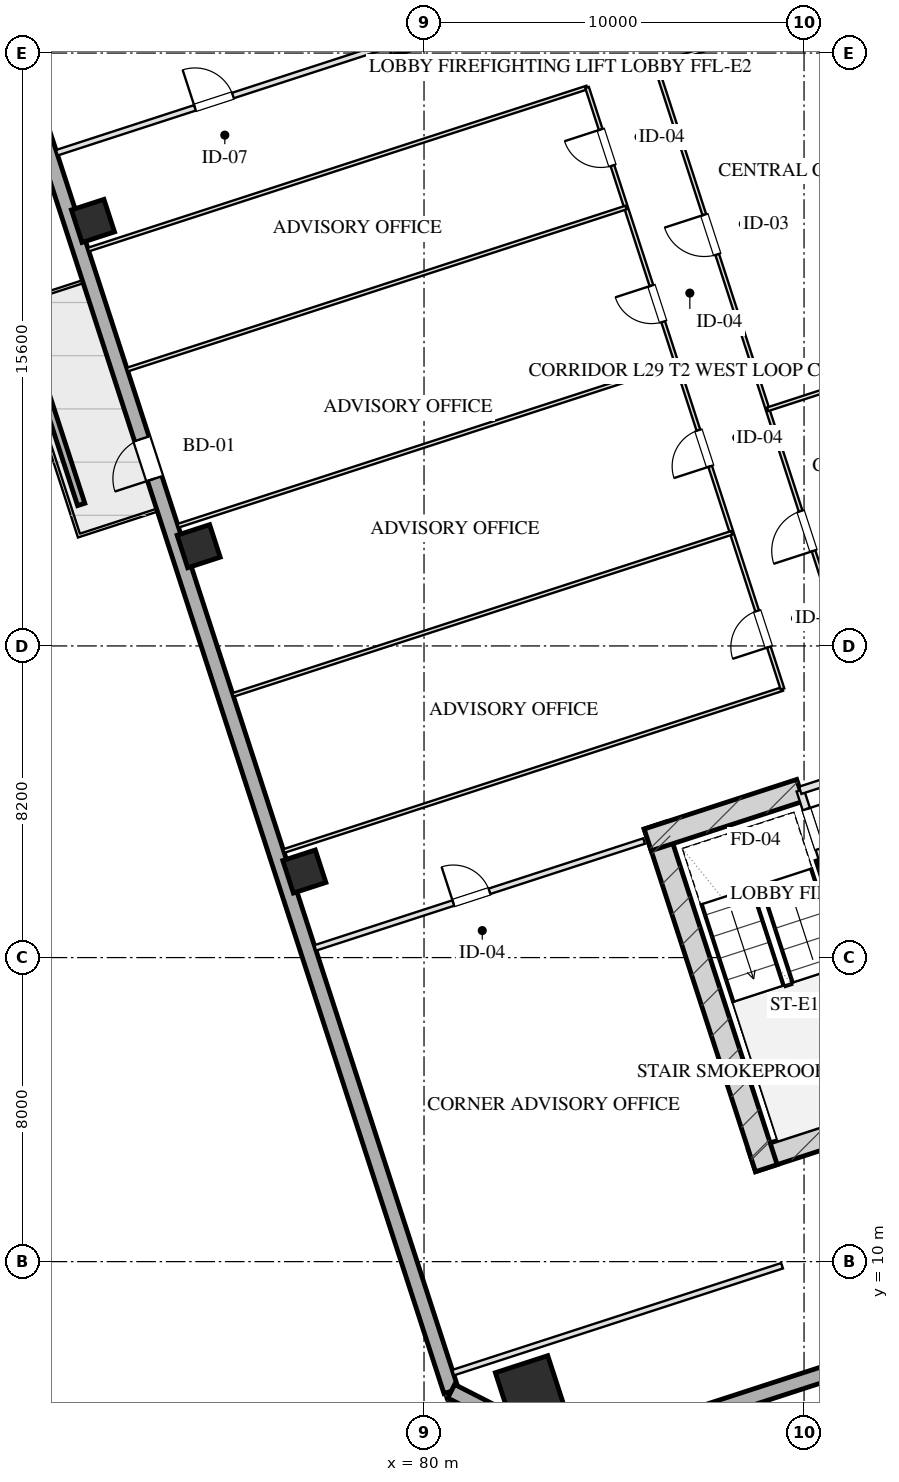
"""IFC4 building model, lengths in metres.
Left out: names, types, materials, properties, quantities, classifications, styles, units other than length and angle.
Written with IfcOpenShell. Run it as: python <this file> out.ifc"""

import sys

from ifc_helpers import new_model, si_unit, direction, frame, frame_2d, origin, origin_2d, place, context, subcontext, project, spatial, rectangle, hollow_rectangle, extrude, element, fill, save


model = new_model("IFC4")
c1 = context("Model", 3, precision=1e-05, world=origin(), true_north=direction((0.0, 1.0)))
c2 = subcontext(c1, "Body", "Model", "MODEL_VIEW")
j1 = project(units=[si_unit("LENGTHUNIT", "METRE"), si_unit("PLANEANGLEUNIT", "RADIAN")], contexts=[c1])
p1 = place(None, origin())
s1 = spatial("IfcSite", under=j1, at=p1, CompositionType="ELEMENT")
p2 = place(p1, origin())
s2 = spatial("IfcBuilding", under=s1, at=p2, CompositionType="ELEMENT")
p3 = place(p2, frame((0.0, 0.0, 113.85)))
s3 = spatial("IfcBuildingStorey", under=s2, at=p3, CompositionType="ELEMENT", Elevation=113.85)
p4 = place(p3, frame((88.63, 12.652, 0.0), z_axis=(0.0, 0.0, 1.0), x_axis=(0.95105714907, 0.309015046886, 0.0)))
e1 = element("IfcWall", 1, at=p4, inside=s3, PredefinedType="SHEAR", context=c2, shape_type="SweptSolid", body=[
    extrude(rectangle(XDim=16.4, YDim=0.6, at=frame_2d((8.2, 0.0))), origin(), (0.0, 0.0, 1.0), 3.45),
])
p5 = place(p3, frame((86.078, 21.475, 0.0), z_axis=(0.0, 0.0, 1.0), x_axis=(0.309017938678, -0.951056209472, 0.0)))
e2 = element("IfcWall", 2, at=p5, inside=s3, PredefinedType="SHEAR", context=c2, shape_type="SweptSolid", body=[
    extrude(rectangle(XDim=9.48, YDim=0.6, at=frame_2d((4.74, 0.0))), origin(), (0.0, 0.0, 1.0), 3.45),
])
p6 = place(p3, frame((90.486, 20.594, 0.0), z_axis=(0.0, 0.0, 1.0), x_axis=(0.309020428229, -0.951055400562, 0.0)))
e3 = element("IfcWall", 3, at=p6, inside=s3, PredefinedType="SHEAR", context=c2, shape_type="SweptSolid", body=[
    extrude(rectangle(XDim=6.98, YDim=0.35, at=frame_2d((3.49, 0.0))), origin(), (0.0, 0.0, 1.0), 3.45),
])
p7 = place(p3, frame((85.886, 21.097, 0.0), z_axis=(0.0, 0.0, 1.0), x_axis=(0.951068073652, 0.308981422225, 0.0)))
e4 = element("IfcWall", 4, at=p7, inside=s3, PredefinedType="SHEAR", context=c2, shape_type="SweptSolid", body=[
    extrude(rectangle(XDim=4.22, YDim=0.6, at=frame_2d((2.11, 0.0))), origin(), (0.0, 0.0, 1.0), 3.45),
])
p8 = place(p3, frame((79.466, 41.828, 0.0), z_axis=(0.0, 0.0, 1.0), x_axis=(-0.309041232772, 0.951048640421, 0.0)))
e5 = element("IfcWall", 5, at=p8, inside=s3, PredefinedType="SHEAR", context=c2, shape_type="SweptSolid", body=[
    extrude(rectangle(XDim=9.48, YDim=0.6, at=frame_2d((4.74, 0.0))), origin(), (0.0, 0.0, 1.0), 3.45),
])
p9 = place(p3, frame((79.087, 42.021, 0.0), z_axis=(0.0, 0.0, 1.0), x_axis=(0.951062550203, 0.3089984233, 0.0)))
e6 = element("IfcWall", 6, at=p9, inside=s3, PredefinedType="SHEAR", context=c2, shape_type="SweptSolid", body=[
    extrude(rectangle(XDim=4.22, YDim=0.6, at=frame_2d((2.11, 0.0))), origin(), (0.0, 0.0, 1.0), 3.45),
])
p10 = place(p3, frame((82.791, 6.612, 0.0), z_axis=(0.0, 0.0, 1.0), x_axis=(0.951056516295, 0.309016994375, 0.0)))
e7 = element("IfcColumn", 7, at=p10, inside=s3, PredefinedType="COLUMN", context=c2, shape_type="SweptSolid", body=[
    extrude(hollow_rectangle(XDim=1.45, YDim=1.45, WallThickness=0.05, at=origin_2d()), origin(), (0.0, 0.0, 1.0), 3.451),
])
for number, where, z_axis, x_axis in (
    (8, (76.851, 20.264, 0.0), (0.0, 0.0, 1.0), (0.951, 0.309, 0.0)),
    (9, (74.07, 28.824, 0.0), (0.0, 0.0, 1.0), (0.951, 0.309, 0.0)),
    (10, (71.289, 37.384, 0.0), (0.0, 0.0, 1.0), (0.951, 0.309, 0.0)),
):
    element("IfcColumn", number, at=place(p3, frame(where, z_axis=z_axis, x_axis=x_axis)), inside=s3, PredefinedType="COLUMN", context=c2, shape_type="SweptSolid", body=[
        extrude(hollow_rectangle(XDim=0.9, YDim=0.9, WallThickness=0.032, at=origin_2d()), origin(), (0.0, 0.0, 1.0), 3.451),
    ])
p11 = place(p3, frame((80.716, 6.59, 0.0), z_axis=(0.0, 0.0, 1.0), x_axis=(-0.309017542002, 0.95105633836, 0.0)))
e11 = element("IfcWall", 11, at=p11, inside=s3, PredefinedType="SOLIDWALL", context=c2, shape_type="SweptSolid", body=[
    extrude(rectangle(XDim=46.4, YDim=0.4, at=frame_2d((23.2, 0.0))), origin(), (0.0, 0.0, 1.0), 2.61),
])
p12 = place(p11, frame((25.25, 0.0, 0.0)))
e12 = element("IfcOpeningElement", 12, at=p12, cuts=e11, PredefinedType="OPENING", context=c2, shape_type="SweptSolid", body=[
    extrude(rectangle(XDim=1.1, YDim=2.15, at=frame_2d((0.55, 1.075))), frame((0.0, 0.21, 0.0), z_axis=(0.0, -1.0, 0.0), x_axis=(1.0, 0.0, 0.0)), (0.0, 0.0, 1.0), 0.42),
])
p13 = place(p3, frame((111.953, 14.005, 0.0), z_axis=(0.0, 0.0, 1.0), x_axis=(-0.95105505922, -0.309021478754, 0.0)))
e13 = element("IfcWall", 13, at=p13, inside=s3, PredefinedType="SOLIDWALL", context=c2, shape_type="SweptSolid", body=[
    extrude(rectangle(XDim=29.4, YDim=0.4, at=frame_2d((14.7, 0.0))), origin(), (0.0, 0.0, 1.0), 2.61),
])
p14 = place(p3, frame((83.992, 4.92, 0.0), z_axis=(0.0, 0.0, 1.0), x_axis=(-0.891001999643, 0.45399937955, 0.0)))
e14 = element("IfcWall", 14, at=p14, inside=s3, PredefinedType="SOLIDWALL", context=c2, shape_type="SweptSolid", body=[
    extrude(rectangle(XDim=3.677, YDim=0.4, at=frame_2d((1.839, 0.0))), origin(), (0.0, 0.0, 1.0), 2.61),
])
p15 = place(p3, frame((70.979, 29.923, 0.0), z_axis=(0.0, 0.0, 1.0), x_axis=(-0.308986014439, 0.951066581729, 0.0)))
e15 = element("IfcWall", 15, at=p15, inside=s3, PredefinedType="PARAPET", context=c2, shape_type="SweptSolid", body=[
    extrude(rectangle(XDim=4.8, YDim=0.2, at=frame_2d((2.4, 0.0))), origin(), (0.0, 0.0, 1.0), 0.75),
])
p16 = place(p3, frame((89.899, 22.401, 0.0), z_axis=(0.0, 0.0, 1.0), x_axis=(0.308932062672, -0.951084108086, 0.0)))
e16 = element("IfcWall", 16, at=p16, inside=s3, PredefinedType="PARTITIONING", context=c2, shape_type="SweptSolid", body=[
    extrude(rectangle(XDim=1.9, YDim=0.2, at=frame_2d((0.95, 0.0))), origin(), (0.0, 0.0, 1.0), 3.175),
])
p17 = place(p16, frame((0.52, 0.0, 0.0)))
e17 = element("IfcOpeningElement", 17, at=p17, cuts=e16, PredefinedType="OPENING", context=c2, shape_type="SweptSolid", body=[
    extrude(rectangle(XDim=1.1, YDim=2.05, at=frame_2d((0.55, 1.025))), frame((0.0, 0.11, 0.0), z_axis=(0.0, -1.0, 0.0), x_axis=(1.0, 0.0, 0.0)), (0.0, 0.0, 1.0), 0.22),
])
p18 = place(p3, frame((89.899, 22.401, 0.0), z_axis=(0.0, 0.0, 1.0), x_axis=(0.951046716504, 0.309047153403, 0.0)))
e18 = element("IfcWall", 18, at=p18, inside=s3, PredefinedType="PARTITIONING", context=c2, shape_type="SweptSolid", body=[
    extrude(rectangle(XDim=3.83, YDim=0.2, at=frame_2d((1.915, 0.0))), origin(), (0.0, 0.0, 1.0), 3.175),
])
p19 = place(p18, frame((1.35, 0.0, 0.0)))
e19 = element("IfcOpeningElement", 19, at=p19, cuts=e18, PredefinedType="OPENING", context=c2, shape_type="SweptSolid", body=[
    extrude(rectangle(XDim=1.2, YDim=2.05, at=frame_2d((0.6, 1.025))), frame((0.0, 0.11, 0.0), z_axis=(0.0, -1.0, 0.0), x_axis=(1.0, 0.0, 0.0)), (0.0, 0.0, 1.0), 0.22),
])
p20 = place(p3, frame((80.767, 7.079, 0.0), z_axis=(0.0, 0.0, 1.0), x_axis=(0.951057133767, 0.309015093986, 0.0)))
e20 = element("IfcWall", 20, at=p20, inside=s3, PredefinedType="PARTITIONING", context=c2, shape_type="SweptSolid", body=[
    extrude(rectangle(XDim=9.1, YDim=0.15, at=frame_2d((4.55, 0.0))), origin(), (0.0, 0.0, 1.0), 3.175),
])
p21 = place(p3, frame((77.136, 18.254, 0.0), z_axis=(0.0, 0.0, 1.0), x_axis=(0.951057133767, 0.309015093986, 0.0)))
e21 = element("IfcWall", 21, at=p21, inside=s3, PredefinedType="PARTITIONING", context=c2, shape_type="SweptSolid", body=[
    extrude(rectangle(XDim=9.1, YDim=0.15, at=frame_2d((4.55, 0.0))), origin(), (0.0, 0.0, 1.0), 3.175),
])
p22 = place(p21, frame((3.822, 0.0, 0.0)))
e22 = element("IfcOpeningElement", 22, at=p22, cuts=e21, PredefinedType="OPENING", context=c2, shape_type="SweptSolid", body=[
    extrude(rectangle(XDim=1.0, YDim=2.05, at=frame_2d((0.5, 1.025))), frame((0.0, 0.085, 0.0), z_axis=(0.0, -1.0, 0.0), x_axis=(1.0, 0.0, 0.0)), (0.0, 0.0, 1.0), 0.17),
])
p23 = place(p3, frame((70.338, 39.177, 0.0), z_axis=(0.0, 0.0, 1.0), x_axis=(0.951059695568, 0.309007209409, 0.0)))
e23 = element("IfcWall", 23, at=p23, inside=s3, PredefinedType="PARTITIONING", context=c2, shape_type="SweptSolid", body=[
    extrude(rectangle(XDim=9.1, YDim=0.15, at=frame_2d((4.55, 0.0))), origin(), (0.0, 0.0, 1.0), 3.175),
])
p24 = place(p23, frame((3.822, 0.0, 0.0)))
e24 = element("IfcOpeningElement", 24, at=p24, cuts=e23, PredefinedType="OPENING", context=c2, shape_type="SweptSolid", body=[
    extrude(rectangle(XDim=1.05, YDim=2.05, at=frame_2d((0.525, 1.025))), frame((0.0, 0.085, 0.0), z_axis=(0.0, -1.0, 0.0), x_axis=(1.0, 0.0, 0.0)), (0.0, 0.0, 1.0), 0.17),
])
p25 = place(p3, frame((76.308, 20.803, 0.0), z_axis=(0.0, 0.0, 1.0), x_axis=(0.951058377365, 0.309011266531, 0.0)))
e25 = element("IfcWall", 25, at=p25, inside=s3, PredefinedType="MOVABLE", context=c2, shape_type="SweptSolid", body=[
    extrude(rectangle(XDim=13.8, YDim=0.1, at=frame_2d((6.9, 0.0))), origin(), (0.0, 0.0, 1.0), 3.175),
])
p26 = place(p3, frame((71.166, 36.629, 0.0), z_axis=(0.0, 0.0, 1.0), x_axis=(0.951056688031, 0.309016465825, 0.0)))
e26 = element("IfcWall", 26, at=p26, inside=s3, PredefinedType="MOVABLE", context=c2, shape_type="SweptSolid", body=[
    extrude(rectangle(XDim=13.8, YDim=0.1, at=frame_2d((6.9, 0.0))), origin(), (0.0, 0.0, 1.0), 3.175),
])
p27 = place(p3, frame((86.097, 41.48, 0.0), z_axis=(0.0, 0.0, 1.0), x_axis=(0.951060182336, 0.309005711233, 0.0)))
e27 = element("IfcWall", 27, at=p27, inside=s3, PredefinedType="MOVABLE", context=c2, shape_type="SweptSolid", body=[
    extrude(rectangle(XDim=7.9, YDim=0.1, at=frame_2d((3.95, 0.0))), origin(), (0.0, 0.0, 1.0), 3.175),
])
p28 = place(p3, frame((89.433, 25.067, 0.0), z_axis=(0.0, 0.0, 1.0), x_axis=(-0.30901773025, 0.951056277195, 0.0)))
e28 = element("IfcWall", 28, at=p28, inside=s3, PredefinedType="MOVABLE", context=c2, shape_type="SweptSolid", body=[
    extrude(rectangle(XDim=16.64, YDim=0.1, at=frame_2d((8.32, 0.0))), origin(), (0.0, 0.0, 1.0), 3.175),
])
p29 = place(p28, frame((1.16, 0.0, 0.0)))
e29 = element("IfcOpeningElement", 29, at=p29, cuts=e28, PredefinedType="OPENING", context=c2, shape_type="SweptSolid", body=[
    extrude(rectangle(XDim=1.0, YDim=2.05, at=frame_2d((0.5, 1.025))), frame((0.0, 0.06, 0.0), z_axis=(0.0, -1.0, 0.0), x_axis=(1.0, 0.0, 0.0)), (0.0, 0.0, 1.0), 0.12),
])
p30 = place(p28, frame((6.16, 0.0, 0.0)))
e30 = element("IfcOpeningElement", 30, at=p30, cuts=e28, PredefinedType="OPENING", context=c2, shape_type="SweptSolid", body=[
    extrude(rectangle(XDim=1.0, YDim=2.05, at=frame_2d((0.5, 1.025))), frame((0.0, 0.06, 0.0), z_axis=(0.0, -1.0, 0.0), x_axis=(1.0, 0.0, 0.0)), (0.0, 0.0, 1.0), 0.12),
])
p31 = place(p28, frame((10.16, 0.0, 0.0)))
e31 = element("IfcOpeningElement", 31, at=p31, cuts=e28, PredefinedType="OPENING", context=c2, shape_type="SweptSolid", body=[
    extrude(rectangle(XDim=1.0, YDim=2.05, at=frame_2d((0.5, 1.025))), frame((0.0, 0.06, 0.0), z_axis=(0.0, -1.0, 0.0), x_axis=(1.0, 0.0, 0.0)), (0.0, 0.0, 1.0), 0.12),
])
p32 = place(p28, frame((14.48, 0.0, 0.0)))
e32 = element("IfcOpeningElement", 32, at=p32, cuts=e28, PredefinedType="OPENING", context=c2, shape_type="SweptSolid", body=[
    extrude(rectangle(XDim=1.0, YDim=2.05, at=frame_2d((0.5, 1.025))), frame((0.0, 0.06, 0.0), z_axis=(0.0, -1.0, 0.0), x_axis=(1.0, 0.0, 0.0)), (0.0, 0.0, 1.0), 0.12),
])
p33 = place(p3, frame((91.24, 25.655, 0.0), z_axis=(0.0, 0.0, 1.0), x_axis=(-0.30901773025, 0.951056277195, 0.0)))
e33 = element("IfcWall", 33, at=p33, inside=s3, PredefinedType="MOVABLE", context=c2, shape_type="SweptSolid", body=[
    extrude(rectangle(XDim=16.64, YDim=0.1, at=frame_2d((8.32, 0.0))), origin(), (0.0, 0.0, 1.0), 3.175),
])
p34 = place(p33, frame((3.204, 0.0, 0.0)))
e34 = element("IfcOpeningElement", 34, at=p34, cuts=e33, PredefinedType="OPENING", context=c2, shape_type="SweptSolid", body=[
    extrude(rectangle(XDim=1.1, YDim=2.05, at=frame_2d((0.55, 1.025))), frame((0.0, 0.06, 0.0), z_axis=(0.0, -1.0, 0.0), x_axis=(1.0, 0.0, 0.0)), (0.0, 0.0, 1.0), 0.12),
])
p35 = place(p33, frame((11.404, 0.0, 0.0)))
e35 = element("IfcOpeningElement", 35, at=p35, cuts=e33, PredefinedType="OPENING", context=c2, shape_type="SweptSolid", body=[
    extrude(rectangle(XDim=1.1, YDim=2.05, at=frame_2d((0.55, 1.025))), frame((0.0, 0.06, 0.0), z_axis=(0.0, -1.0, 0.0), x_axis=(1.0, 0.0, 0.0)), (0.0, 0.0, 1.0), 0.12),
])
p36 = place(p3, frame((89.039, 32.426, 0.0), z_axis=(0.0, 0.0, 1.0), x_axis=(0.951051099951, 0.309033663672, 0.0)))
e36 = element("IfcWall", 36, at=p36, inside=s3, PredefinedType="MOVABLE", context=c2, shape_type="SweptSolid", body=[
    extrude(rectangle(XDim=7.9, YDim=0.1, at=frame_2d((3.95, 0.0))), origin(), (0.0, 0.0, 1.0), 3.175),
])
p37 = place(p3, frame((74.973, 24.912, 0.0), z_axis=(0.0, 0.0, 1.0), x_axis=(0.951058377365, 0.309011266531, 0.0)))
e37 = element("IfcWall", 37, at=p37, inside=s3, PredefinedType="MOVABLE", context=c2, shape_type="SweptSolid", body=[
    extrude(rectangle(XDim=13.8, YDim=0.1, at=frame_2d((6.9, 0.0))), origin(), (0.0, 0.0, 1.0), 3.175),
])
for number, where, z_axis, x_axis in (
    (38, (73.527, 29.363, 0.0), (0.0, 0.0, 1.0), (0.951, 0.309, 0.0)),
    (39, (72.192, 33.471, 0.0), (0.0, 0.0, 1.0), (0.951, 0.309, 0.0)),
):
    element("IfcWall", number, at=place(p3, frame(where, z_axis=z_axis, x_axis=x_axis)), inside=s3, PredefinedType="MOVABLE", context=c2, shape_type="SweptSolid", body=[
        extrude(rectangle(XDim=13.8, YDim=0.1, at=frame_2d((6.9, 0.0))), origin(), (0.0, 0.0, 1.0), 3.175),
    ])
p38 = place(p12, origin())
e40 = element("IfcDoor", 40, at=p38, inside=s3, OperationType="SINGLE_SWING_LEFT", PredefinedType="DOOR", context=c2, shape_type="SweptSolid", body=[
    extrude(rectangle(XDim=1.1, YDim=2.15, at=frame_2d((0.55, 1.075))), frame((0.0, 0.025, 0.0), z_axis=(0.0, -1.0, 0.0), x_axis=(1.0, 0.0, 0.0)), (0.0, 0.0, 1.0), 0.05),
])
fill(e12, e40)
p39 = place(p17, origin())
e41 = element("IfcDoor", 41, at=p39, inside=s3, OperationType="SINGLE_SWING_LEFT", PredefinedType="DOOR", context=c2, shape_type="SweptSolid", body=[
    extrude(rectangle(XDim=1.1, YDim=2.05, at=frame_2d((0.55, 1.025))), frame((0.0, 0.025, 0.0), z_axis=(0.0, -1.0, 0.0), x_axis=(1.0, 0.0, 0.0)), (0.0, 0.0, 1.0), 0.05),
])
fill(e17, e41)
p40 = place(p22, origin())
e42 = element("IfcDoor", 42, at=p40, inside=s3, OperationType="SINGLE_SWING_LEFT", PredefinedType="DOOR", context=c2, shape_type="SweptSolid", body=[
    extrude(rectangle(XDim=1.0, YDim=2.05, at=frame_2d((0.5, 1.025))), frame((0.0, 0.025, 0.0), z_axis=(0.0, -1.0, 0.0), x_axis=(1.0, 0.0, 0.0)), (0.0, 0.0, 1.0), 0.05),
])
fill(e22, e42)
p41 = place(p24, origin())
e43 = element("IfcDoor", 43, at=p41, inside=s3, OperationType="SINGLE_SWING_LEFT", PredefinedType="DOOR", context=c2, shape_type="SweptSolid", body=[
    extrude(rectangle(XDim=1.05, YDim=2.05, at=frame_2d((0.525, 1.025))), frame((0.0, 0.025, 0.0), z_axis=(0.0, -1.0, 0.0), x_axis=(1.0, 0.0, 0.0)), (0.0, 0.0, 1.0), 0.05),
])
fill(e24, e43)
p42 = place(p29, origin())
e44 = element("IfcDoor", 44, at=p42, inside=s3, OperationType="SINGLE_SWING_LEFT", PredefinedType="DOOR", context=c2, shape_type="SweptSolid", body=[
    extrude(rectangle(XDim=1.0, YDim=2.05, at=frame_2d((0.5, 1.025))), frame((0.0, 0.025, 0.0), z_axis=(0.0, -1.0, 0.0), x_axis=(1.0, 0.0, 0.0)), (0.0, 0.0, 1.0), 0.05),
])
fill(e29, e44)
p43 = place(p30, origin())
e45 = element("IfcDoor", 45, at=p43, inside=s3, OperationType="SINGLE_SWING_LEFT", PredefinedType="DOOR", context=c2, shape_type="SweptSolid", body=[
    extrude(rectangle(XDim=1.0, YDim=2.05, at=frame_2d((0.5, 1.025))), frame((0.0, 0.025, 0.0), z_axis=(0.0, -1.0, 0.0), x_axis=(1.0, 0.0, 0.0)), (0.0, 0.0, 1.0), 0.05),
])
fill(e30, e45)
p44 = place(p31, origin())
e46 = element("IfcDoor", 46, at=p44, inside=s3, OperationType="SINGLE_SWING_RIGHT", PredefinedType="DOOR", context=c2, shape_type="SweptSolid", body=[
    extrude(rectangle(XDim=1.0, YDim=2.05, at=frame_2d((0.5, 1.025))), frame((0.0, 0.025, 0.0), z_axis=(0.0, -1.0, 0.0), x_axis=(1.0, 0.0, 0.0)), (0.0, 0.0, 1.0), 0.05),
])
fill(e31, e46)
p45 = place(p32, origin())
e47 = element("IfcDoor", 47, at=p45, inside=s3, OperationType="SINGLE_SWING_RIGHT", PredefinedType="DOOR", context=c2, shape_type="SweptSolid", body=[
    extrude(rectangle(XDim=1.0, YDim=2.05, at=frame_2d((0.5, 1.025))), frame((0.0, 0.025, 0.0), z_axis=(0.0, -1.0, 0.0), x_axis=(1.0, 0.0, 0.0)), (0.0, 0.0, 1.0), 0.05),
])
fill(e32, e47)
p46 = place(p34, origin())
e48 = element("IfcDoor", 48, at=p46, inside=s3, OperationType="SINGLE_SWING_LEFT", PredefinedType="DOOR", context=c2, shape_type="SweptSolid", body=[
    extrude(rectangle(XDim=1.1, YDim=2.05, at=frame_2d((0.55, 1.025))), frame((0.0, 0.025, 0.0), z_axis=(0.0, -1.0, 0.0), x_axis=(1.0, 0.0, 0.0)), (0.0, 0.0, 1.0), 0.05),
])
fill(e34, e48)
p47 = place(p35, origin())
e49 = element("IfcDoor", 49, at=p47, inside=s3, OperationType="SINGLE_SWING_RIGHT", PredefinedType="DOOR", context=c2, shape_type="SweptSolid", body=[
    extrude(rectangle(XDim=1.1, YDim=2.05, at=frame_2d((0.55, 1.025))), frame((0.0, 0.025, 0.0), z_axis=(0.0, -1.0, 0.0), x_axis=(1.0, 0.0, 0.0)), (0.0, 0.0, 1.0), 0.05),
])
fill(e35, e49)
save(model, sys.argv[1])
